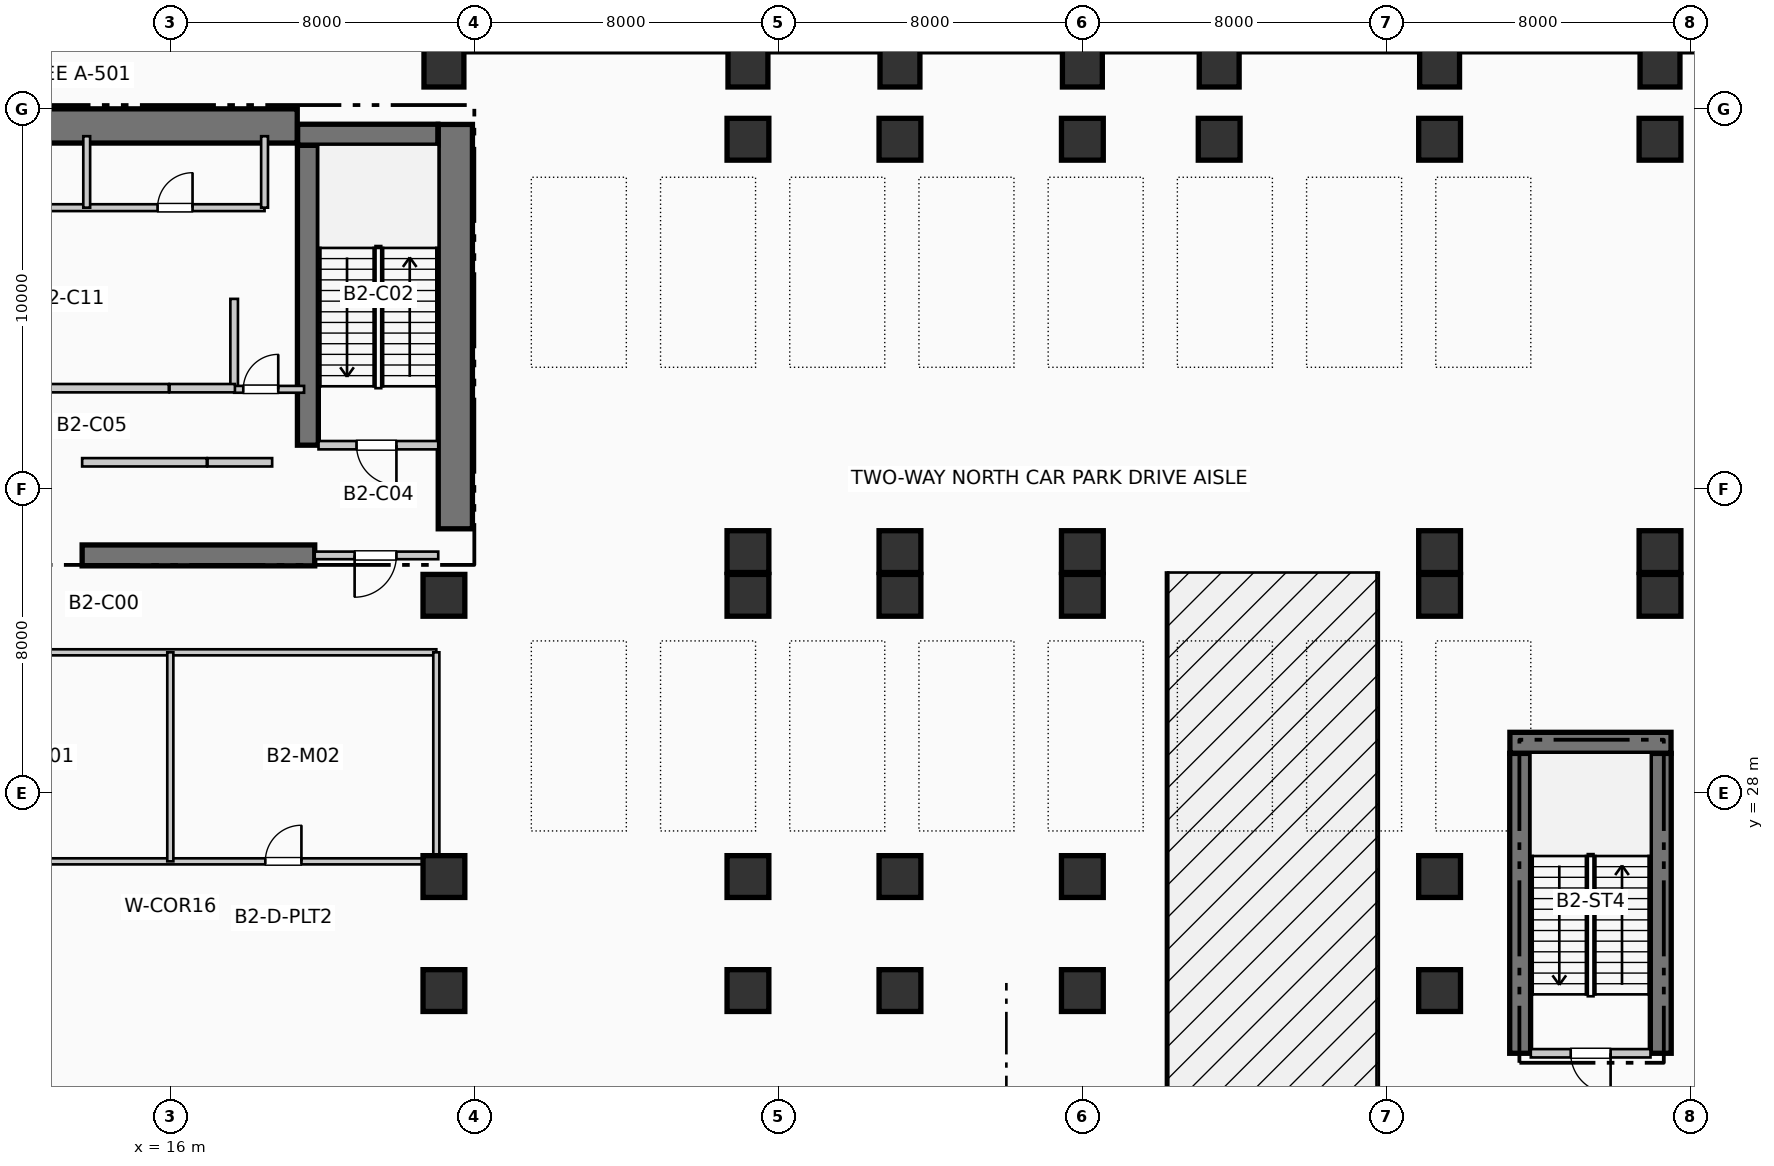
"""IFC4 building model, lengths in metres.
Left out: names, types, materials, properties, quantities, classifications, styles, units other than length and angle.
Written with IfcOpenShell. Run it as: python <this file> out.ifc"""

import sys

from ifc_helpers import new_model, si_unit, direction, frame, frame_2d, origin, origin_2d, place, context, subcontext, project, spatial, rectangle, extrude, element, fill, save


model = new_model("IFC4")
c1 = context("Model", 3, precision=1e-05, world=origin(), true_north=direction((0.0, 1.0)))
c2 = subcontext(c1, "Body", "Model", "MODEL_VIEW")
j1 = project(units=[si_unit("LENGTHUNIT", "METRE"), si_unit("PLANEANGLEUNIT", "RADIAN")], contexts=[c1])
p1 = place(None, origin())
s1 = spatial("IfcSite", under=j1, at=p1, CompositionType="ELEMENT")
p2 = place(p1, origin())
s2 = spatial("IfcBuilding", under=s1, at=p2, CompositionType="ELEMENT")
p3 = place(p2, frame((0.0, 0.0, -9.24)))
s3 = spatial("IfcBuildingStorey", under=s2, at=p3, CompositionType="ELEMENT", Elevation=-9.24)
p4 = place(p3, frame((5.36, 45.55, 0.0), z_axis=(0.0, 0.0, 1.0), x_axis=(1.0, 0.0, 0.0)))
e1 = element("IfcWall", 1, at=p4, inside=s3, PredefinedType="SHEAR", context=c2, shape_type="SweptSolid", body=[
    extrude(rectangle(XDim=13.98, YDim=0.9, at=frame_2d((6.99, 0.0))), origin(), (0.0, 0.0, 1.0), 4.62),
])
p5 = place(p3, frame((23.5, 34.95, 0.0), z_axis=(0.0, 0.0, 1.0), x_axis=(0.0, 1.0, 0.0)))
e2 = element("IfcWall", 2, at=p5, inside=s3, PredefinedType="SHEAR", context=c2, shape_type="SweptSolid", body=[
    extrude(rectangle(XDim=10.64, YDim=0.9, at=frame_2d((5.32, 0.0))), origin(), (0.0, 0.0, 1.0), 4.62),
])
p6 = place(p3, frame((13.68, 34.25, 0.0), z_axis=(0.0, 0.0, 1.0), x_axis=(1.0, 0.0, 0.0)))
e3 = element("IfcWall", 3, at=p6, inside=s3, PredefinedType="SHEAR", context=c2, shape_type="SweptSolid", body=[
    extrude(rectangle(XDim=6.12, YDim=0.55, at=frame_2d((3.06, 0.0))), origin(), (0.0, 0.0, 1.0), 4.62),
])
p7 = place(p3, frame((19.62, 37.15, 0.0), z_axis=(0.0, 0.0, 1.0), x_axis=(0.0, 1.0, 0.0)))
e4 = element("IfcWall", 4, at=p7, inside=s3, PredefinedType="SHEAR", context=c2, shape_type="SweptSolid", body=[
    extrude(rectangle(XDim=7.89, YDim=0.55, at=frame_2d((3.945, 0.0))), origin(), (0.0, 0.0, 1.0), 4.62),
])
p8 = place(p3, frame((19.35, 45.32, 0.0), z_axis=(0.0, 0.0, 1.0), x_axis=(1.0, 0.0, 0.0)))
e5 = element("IfcWall", 5, at=p8, inside=s3, PredefinedType="SHEAR", context=c2, shape_type="SweptSolid", body=[
    extrude(rectangle(XDim=3.69, YDim=0.55, at=frame_2d((1.845, 0.0))), origin(), (0.0, 0.0, 1.0), 4.62),
])
for number, where, z_axis, x_axis in (
    (6, (51.52, 21.15, 0.0), (0.0, 0.0, 1.0), (0.0, 1.0, 0.0)),
    (7, (55.22, 21.15, 0.0), (0.0, 0.0, 1.0), (0.0, 1.0, 0.0)),
):
    element("IfcWall", number, at=place(p3, frame(where, z_axis=z_axis, x_axis=x_axis)), inside=s3, PredefinedType="SHEAR", context=c2, shape_type="SweptSolid", body=[
        extrude(rectangle(XDim=7.89, YDim=0.55, at=frame_2d((3.945, 0.0))), origin(), (0.0, 0.0, 1.0), 4.62),
    ])
p9 = place(p3, frame((51.25, 29.32, 0.0), z_axis=(0.0, 0.0, 1.0), x_axis=(1.0, 0.0, 0.0)))
e8 = element("IfcWall", 8, at=p9, inside=s3, PredefinedType="SHEAR", context=c2, shape_type="SweptSolid", body=[
    extrude(rectangle(XDim=4.24, YDim=0.55, at=frame_2d((2.12, 0.0))), origin(), (0.0, 0.0, 1.0), 4.62),
])
for number, where, z_axis, x_axis in (
    (9, (23.2, 22.8, 0.0), (0.0, 0.0, 1.0), (1.0, 0.0, 0.0)),
    (10, (23.2, 25.8, 0.0), (0.0, 0.0, 1.0), (1.0, 0.0, 0.0)),
    (11, (23.2, 33.2, 0.0), (0.0, 0.0, 1.0), (1.0, 0.0, 0.0)),
):
    element("IfcColumn", number, at=place(p3, frame(where, z_axis=z_axis, x_axis=x_axis)), inside=s3, PredefinedType="COLUMN", context=c2, shape_type="SweptSolid", body=[
        extrude(rectangle(XDim=1.1, YDim=1.1, at=origin_2d()), origin(), (0.0, 0.0, 1.0), 4.62),
    ])
p10 = place(p3, frame((23.2, 47.1, 0.0), z_axis=(0.0, 0.0, 1.0), x_axis=(1.0, 0.0, 0.0)))
e12 = element("IfcColumn", 12, at=p10, inside=s3, PredefinedType="COLUMN", context=c2, shape_type="SweptSolid", body=[
    extrude(rectangle(XDim=1.05, YDim=1.05, at=origin_2d()), origin(), (0.0, 0.0, 1.0), 4.62),
])
for number, where, z_axis, x_axis in (
    (13, (31.2, 22.8, 0.0), (0.0, 0.0, 1.0), (1.0, 0.0, 0.0)),
    (14, (31.2, 25.8, 0.0), (0.0, 0.0, 1.0), (1.0, 0.0, 0.0)),
    (15, (31.2, 33.2, 0.0), (0.0, 0.0, 1.0), (1.0, 0.0, 0.0)),
    (16, (31.2, 34.35, 0.0), (0.0, 0.0, 1.0), (1.0, 0.0, 0.0)),
    (17, (31.2, 45.2, 0.0), (0.0, 0.0, 1.0), (1.0, 0.0, 0.0)),
):
    element("IfcColumn", number, at=place(p3, frame(where, z_axis=z_axis, x_axis=x_axis)), inside=s3, PredefinedType="COLUMN", context=c2, shape_type="SweptSolid", body=[
        extrude(rectangle(XDim=1.1, YDim=1.1, at=origin_2d()), origin(), (0.0, 0.0, 1.0), 4.62),
    ])
p11 = place(p3, frame((31.2, 47.1, 0.0), z_axis=(0.0, 0.0, 1.0), x_axis=(1.0, 0.0, 0.0)))
e18 = element("IfcColumn", 18, at=p11, inside=s3, PredefinedType="COLUMN", context=c2, shape_type="SweptSolid", body=[
    extrude(rectangle(XDim=1.05, YDim=1.05, at=origin_2d()), origin(), (0.0, 0.0, 1.0), 4.62),
])
for number, where, z_axis, x_axis in (
    (19, (35.2, 22.8, 0.0), (0.0, 0.0, 1.0), (1.0, 0.0, 0.0)),
    (20, (35.2, 25.8, 0.0), (0.0, 0.0, 1.0), (1.0, 0.0, 0.0)),
    (21, (35.2, 33.2, 0.0), (0.0, 0.0, 1.0), (1.0, 0.0, 0.0)),
    (22, (35.2, 34.35, 0.0), (0.0, 0.0, 1.0), (1.0, 0.0, 0.0)),
    (23, (35.2, 45.2, 0.0), (0.0, 0.0, 1.0), (1.0, 0.0, 0.0)),
):
    element("IfcColumn", number, at=place(p3, frame(where, z_axis=z_axis, x_axis=x_axis)), inside=s3, PredefinedType="COLUMN", context=c2, shape_type="SweptSolid", body=[
        extrude(rectangle(XDim=1.1, YDim=1.1, at=origin_2d()), origin(), (0.0, 0.0, 1.0), 4.62),
    ])
p12 = place(p3, frame((35.2, 47.1, 0.0), z_axis=(0.0, 0.0, 1.0), x_axis=(1.0, 0.0, 0.0)))
e24 = element("IfcColumn", 24, at=p12, inside=s3, PredefinedType="COLUMN", context=c2, shape_type="SweptSolid", body=[
    extrude(rectangle(XDim=1.05, YDim=1.05, at=origin_2d()), origin(), (0.0, 0.0, 1.0), 4.62),
])
for number, where, z_axis, x_axis in (
    (25, (40.0, 22.8, 0.0), (0.0, 0.0, 1.0), (1.0, 0.0, 0.0)),
    (26, (40.0, 25.8, 0.0), (0.0, 0.0, 1.0), (1.0, 0.0, 0.0)),
    (27, (40.0, 33.2, 0.0), (0.0, 0.0, 1.0), (1.0, 0.0, 0.0)),
    (28, (40.0, 34.35, 0.0), (0.0, 0.0, 1.0), (1.0, 0.0, 0.0)),
    (29, (40.0, 45.2, 0.0), (0.0, 0.0, 1.0), (1.0, 0.0, 0.0)),
):
    element("IfcColumn", number, at=place(p3, frame(where, z_axis=z_axis, x_axis=x_axis)), inside=s3, PredefinedType="COLUMN", context=c2, shape_type="SweptSolid", body=[
        extrude(rectangle(XDim=1.1, YDim=1.1, at=origin_2d()), origin(), (0.0, 0.0, 1.0), 4.62),
    ])
p13 = place(p3, frame((40.0, 47.1, 0.0), z_axis=(0.0, 0.0, 1.0), x_axis=(1.0, 0.0, 0.0)))
e30 = element("IfcColumn", 30, at=p13, inside=s3, PredefinedType="COLUMN", context=c2, shape_type="SweptSolid", body=[
    extrude(rectangle(XDim=1.05, YDim=1.05, at=origin_2d()), origin(), (0.0, 0.0, 1.0), 4.62),
])
p14 = place(p3, frame((43.6, 45.2, 0.0), z_axis=(0.0, 0.0, 1.0), x_axis=(1.0, 0.0, 0.0)))
e31 = element("IfcColumn", 31, at=p14, inside=s3, PredefinedType="COLUMN", context=c2, shape_type="SweptSolid", body=[
    extrude(rectangle(XDim=1.1, YDim=1.1, at=origin_2d()), origin(), (0.0, 0.0, 1.0), 4.62),
])
p15 = place(p3, frame((43.6, 47.1, 0.0), z_axis=(0.0, 0.0, 1.0), x_axis=(1.0, 0.0, 0.0)))
e32 = element("IfcColumn", 32, at=p15, inside=s3, PredefinedType="COLUMN", context=c2, shape_type="SweptSolid", body=[
    extrude(rectangle(XDim=1.05, YDim=1.05, at=origin_2d()), origin(), (0.0, 0.0, 1.0), 4.62),
])
for number, where, z_axis, x_axis in (
    (33, (49.4, 22.8, 0.0), (0.0, 0.0, 1.0), (1.0, 0.0, 0.0)),
    (34, (49.4, 25.8, 0.0), (0.0, 0.0, 1.0), (1.0, 0.0, 0.0)),
    (35, (49.4, 33.2, 0.0), (0.0, 0.0, 1.0), (1.0, 0.0, 0.0)),
    (36, (49.4, 34.35, 0.0), (0.0, 0.0, 1.0), (1.0, 0.0, 0.0)),
    (37, (49.4, 45.2, 0.0), (0.0, 0.0, 1.0), (1.0, 0.0, 0.0)),
):
    element("IfcColumn", number, at=place(p3, frame(where, z_axis=z_axis, x_axis=x_axis)), inside=s3, PredefinedType="COLUMN", context=c2, shape_type="SweptSolid", body=[
        extrude(rectangle(XDim=1.1, YDim=1.1, at=origin_2d()), origin(), (0.0, 0.0, 1.0), 4.62),
    ])
p16 = place(p3, frame((49.4, 47.1, 0.0), z_axis=(0.0, 0.0, 1.0), x_axis=(1.0, 0.0, 0.0)))
e38 = element("IfcColumn", 38, at=p16, inside=s3, PredefinedType="COLUMN", context=c2, shape_type="SweptSolid", body=[
    extrude(rectangle(XDim=1.05, YDim=1.05, at=origin_2d()), origin(), (0.0, 0.0, 1.0), 4.62),
])
for number, where, z_axis, x_axis in (
    (39, (55.2, 33.2, 0.0), (0.0, 0.0, 1.0), (1.0, 0.0, 0.0)),
    (40, (55.2, 34.35, 0.0), (0.0, 0.0, 1.0), (1.0, 0.0, 0.0)),
    (41, (55.2, 45.2, 0.0), (0.0, 0.0, 1.0), (1.0, 0.0, 0.0)),
):
    element("IfcColumn", number, at=place(p3, frame(where, z_axis=z_axis, x_axis=x_axis)), inside=s3, PredefinedType="COLUMN", context=c2, shape_type="SweptSolid", body=[
        extrude(rectangle(XDim=1.1, YDim=1.1, at=origin_2d()), origin(), (0.0, 0.0, 1.0), 4.62),
    ])
p17 = place(p3, frame((55.2, 47.1, 0.0), z_axis=(0.0, 0.0, 1.0), x_axis=(1.0, 0.0, 0.0)))
e42 = element("IfcColumn", 42, at=p17, inside=s3, PredefinedType="COLUMN", context=c2, shape_type="SweptSolid", body=[
    extrude(rectangle(XDim=1.05, YDim=1.05, at=origin_2d()), origin(), (0.0, 0.0, 1.0), 4.62),
])
p18 = place(p3, frame((19.9, 37.15, 0.0), z_axis=(0.0, 0.0, 1.0), x_axis=(1.0, 0.0, 0.0)))
e43 = element("IfcWall", 43, at=p18, inside=s3, PredefinedType="PARTITIONING", context=c2, shape_type="SweptSolid", body=[
    extrude(rectangle(XDim=3.15, YDim=0.22, at=frame_2d((1.575, 0.0))), origin(), (0.0, 0.0, 1.0), 4.27),
])
p19 = place(p18, frame((2.05, 0.0, 0.0), z_axis=(0.0, 0.0, 1.0), x_axis=(-1.0, 0.0, 0.0)))
e44 = element("IfcOpeningElement", 44, at=p19, cuts=e43, PredefinedType="OPENING", context=c2, shape_type="SweptSolid", body=[
    extrude(rectangle(XDim=1.05, YDim=2.15, at=frame_2d((0.525, 1.075))), frame((0.0, 0.12, 0.0), z_axis=(0.0, -1.0, 0.0), x_axis=(1.0, 0.0, 0.0)), (0.0, 0.0, 1.0), 0.24),
])
p20 = place(p3, frame((19.8, 34.25, 0.0), z_axis=(0.0, 0.0, 1.0), x_axis=(1.0, 0.0, 0.0)))
e45 = element("IfcWall", 45, at=p20, inside=s3, PredefinedType="PARTITIONING", context=c2, shape_type="SweptSolid", body=[
    extrude(rectangle(XDim=3.25, YDim=0.2, at=frame_2d((1.625, 0.0))), origin(), (0.0, 0.0, 1.0), 4.27),
])
p21 = place(p20, frame((2.15, 0.0, 0.0), z_axis=(0.0, 0.0, 1.0), x_axis=(-1.0, 0.0, 0.0)))
e46 = element("IfcOpeningElement", 46, at=p21, cuts=e45, PredefinedType="OPENING", context=c2, shape_type="SweptSolid", body=[
    extrude(rectangle(XDim=1.1, YDim=2.15, at=frame_2d((0.55, 1.075))), frame((0.0, 0.11, 0.0), z_axis=(0.0, -1.0, 0.0), x_axis=(1.0, 0.0, 0.0)), (0.0, 0.0, 1.0), 0.22),
])
p22 = place(p3, frame((17.68, 38.65, 0.0), z_axis=(0.0, 0.0, 1.0), x_axis=(0.0, 1.0, 0.0)))
e47 = element("IfcWall", 47, at=p22, inside=s3, PredefinedType="PARTITIONING", context=c2, shape_type="SweptSolid", body=[
    extrude(rectangle(XDim=2.35, YDim=0.2, at=frame_2d((1.175, 0.0))), origin(), (0.0, 0.0, 1.0), 4.27),
])
p23 = place(p3, frame((17.68, 38.62, 0.0), z_axis=(0.0, 0.0, 1.0), x_axis=(1.0, 0.0, 0.0)))
e48 = element("IfcWall", 48, at=p23, inside=s3, PredefinedType="PARTITIONING", context=c2, shape_type="SweptSolid", body=[
    extrude(rectangle(XDim=1.84, YDim=0.18, at=frame_2d((0.92, 0.0))), origin(), (0.0, 0.0, 1.0), 4.27),
])
p24 = place(p23, frame((0.24, 0.0, 0.0)))
e49 = element("IfcOpeningElement", 49, at=p24, cuts=e48, PredefinedType="OPENING", context=c2, shape_type="SweptSolid", body=[
    extrude(rectangle(XDim=0.92, YDim=2.1, at=frame_2d((0.46, 1.05))), frame((0.0, 0.1, 0.0), z_axis=(0.0, -1.0, 0.0), x_axis=(1.0, 0.0, 0.0)), (0.0, 0.0, 1.0), 0.2),
])
p25 = place(p3, frame((13.68, 36.7, 0.0), z_axis=(0.0, 0.0, 1.0), x_axis=(1.0, 0.0, 0.0)))
e50 = element("IfcWall", 50, at=p25, inside=s3, PredefinedType="PARTITIONING", context=c2, shape_type="SweptSolid", body=[
    extrude(rectangle(XDim=3.28, YDim=0.22, at=frame_2d((1.64, 0.0))), origin(), (0.0, 0.0, 1.0), 4.27),
])
p26 = place(p3, frame((12.58, 38.65, 0.0), z_axis=(0.0, 0.0, 1.0), x_axis=(1.0, 0.0, 0.0)))
e51 = element("IfcWall", 51, at=p26, inside=s3, PredefinedType="PARTITIONING", context=c2, shape_type="SweptSolid", body=[
    extrude(rectangle(XDim=3.38, YDim=0.22, at=frame_2d((1.69, 0.0))), origin(), (0.0, 0.0, 1.0), 4.27),
])
p27 = place(p3, frame((16.98, 36.7, 0.0), z_axis=(0.0, 0.0, 1.0), x_axis=(1.0, 0.0, 0.0)))
e52 = element("IfcWall", 52, at=p27, inside=s3, PredefinedType="PARTITIONING", context=c2, shape_type="SweptSolid", body=[
    extrude(rectangle(XDim=1.7, YDim=0.22, at=frame_2d((0.85, 0.0))), origin(), (0.0, 0.0, 1.0), 4.27),
])
p28 = place(p3, frame((15.98, 38.65, 0.0), z_axis=(0.0, 0.0, 1.0), x_axis=(1.0, 0.0, 0.0)))
e53 = element("IfcWall", 53, at=p28, inside=s3, PredefinedType="PARTITIONING", context=c2, shape_type="SweptSolid", body=[
    extrude(rectangle(XDim=1.72, YDim=0.22, at=frame_2d((0.86, 0.0))), origin(), (0.0, 0.0, 1.0), 4.27),
])
p29 = place(p3, frame((9.15, 43.4, 0.0), z_axis=(0.0, 0.0, 1.0), x_axis=(1.0, 0.0, 0.0)))
e54 = element("IfcWall", 54, at=p29, inside=s3, PredefinedType="PLUMBINGWALL", context=c2, shape_type="SweptSolid", body=[
    extrude(rectangle(XDim=9.33, YDim=0.18, at=frame_2d((4.665, 0.0))), origin(), (0.0, 0.0, 1.0), 4.27),
])
p30 = place(p29, frame((1.88, 0.0, 0.0)))
e55 = element("IfcOpeningElement", 55, at=p30, cuts=e54, PredefinedType="OPENING", context=c2, shape_type="SweptSolid", body=[
    extrude(rectangle(XDim=0.92, YDim=2.1, at=frame_2d((0.46, 1.05))), frame((0.0, 0.1, 0.0), z_axis=(0.0, -1.0, 0.0), x_axis=(1.0, 0.0, 0.0)), (0.0, 0.0, 1.0), 0.2),
])
p31 = place(p29, frame((6.515, 0.0, 0.0)))
e56 = element("IfcOpeningElement", 56, at=p31, cuts=e54, PredefinedType="OPENING", context=c2, shape_type="SweptSolid", body=[
    extrude(rectangle(XDim=0.92, YDim=2.1, at=frame_2d((0.46, 1.05))), frame((0.0, 0.1, 0.0), z_axis=(0.0, -1.0, 0.0), x_axis=(1.0, 0.0, 0.0)), (0.0, 0.0, 1.0), 0.2),
])
for number, where, z_axis, x_axis in (
    (57, (18.48, 43.4, 0.0), (0.0, 0.0, 1.0), (0.0, 1.0, 0.0)),
    (58, (13.8, 43.4, 0.0), (0.0, 0.0, 1.0), (0.0, 1.0, 0.0)),
):
    element("IfcWall", number, at=place(p3, frame(where, z_axis=z_axis, x_axis=x_axis)), inside=s3, PredefinedType="PLUMBINGWALL", context=c2, shape_type="SweptSolid", body=[
        extrude(rectangle(XDim=1.88, YDim=0.18, at=frame_2d((0.94, 0.0))), origin(), (0.0, 0.0, 1.0), 4.27),
    ])
p32 = place(p3, frame((51.8, 21.15, 0.0), z_axis=(0.0, 0.0, 1.0), x_axis=(1.0, 0.0, 0.0)))
e59 = element("IfcWall", 59, at=p32, inside=s3, PredefinedType="PARTITIONING", context=c2, shape_type="SweptSolid", body=[
    extrude(rectangle(XDim=3.15, YDim=0.22, at=frame_2d((1.575, 0.0))), origin(), (0.0, 0.0, 1.0), 4.27),
])
p33 = place(p32, frame((2.1, 0.0, 0.0), z_axis=(0.0, 0.0, 1.0), x_axis=(-1.0, 0.0, 0.0)))
e60 = element("IfcOpeningElement", 60, at=p33, cuts=e59, PredefinedType="OPENING", context=c2, shape_type="SweptSolid", body=[
    extrude(rectangle(XDim=1.05, YDim=2.15, at=frame_2d((0.525, 1.075))), frame((0.0, 0.12, 0.0), z_axis=(0.0, -1.0, 0.0), x_axis=(1.0, 0.0, 0.0)), (0.0, 0.0, 1.0), 0.24),
])
p34 = place(p3, frame((9.0, 26.2, 0.0), z_axis=(0.0, 0.0, 1.0), x_axis=(1.0, 0.0, 0.0)))
e61 = element("IfcWall", 61, at=p34, inside=s3, PredefinedType="PARTITIONING", context=c2, shape_type="SweptSolid", body=[
    extrude(rectangle(XDim=14.0, YDim=0.16, at=frame_2d((7.0, 0.0))), origin(), (0.0, 0.0, 1.0), 3.455),
])
p35 = place(p34, frame((1.0, 0.0, 0.0)))
e62 = element("IfcOpeningElement", 62, at=p35, cuts=e61, PredefinedType="OPENING", context=c2, shape_type="SweptSolid", body=[
    extrude(rectangle(XDim=0.95, YDim=2.1, at=frame_2d((0.475, 1.05))), frame((0.0, 0.09, 0.0), z_axis=(0.0, -1.0, 0.0), x_axis=(1.0, 0.0, 0.0)), (0.0, 0.0, 1.0), 0.18),
])
p36 = place(p34, frame((9.5, 0.0, 0.0)))
e63 = element("IfcOpeningElement", 63, at=p36, cuts=e61, PredefinedType="OPENING", context=c2, shape_type="SweptSolid", body=[
    extrude(rectangle(XDim=0.95, YDim=2.1, at=frame_2d((0.475, 1.05))), frame((0.0, 0.09, 0.0), z_axis=(0.0, -1.0, 0.0), x_axis=(1.0, 0.0, 0.0)), (0.0, 0.0, 1.0), 0.18),
])
p37 = place(p3, frame((9.0, 31.7, 0.0), z_axis=(0.0, 0.0, 1.0), x_axis=(1.0, 0.0, 0.0)))
e64 = element("IfcWall", 64, at=p37, inside=s3, PredefinedType="PARTITIONING", context=c2, shape_type="SweptSolid", body=[
    extrude(rectangle(XDim=14.0, YDim=0.16, at=frame_2d((7.0, 0.0))), origin(), (0.0, 0.0, 1.0), 4.27),
])
p38 = place(p3, frame((23.0, 26.2, 0.0), z_axis=(0.0, 0.0, 1.0), x_axis=(0.0, 1.0, 0.0)))
e65 = element("IfcWall", 65, at=p38, inside=s3, PredefinedType="PARTITIONING", context=c2, shape_type="SweptSolid", body=[
    extrude(rectangle(XDim=5.5, YDim=0.16, at=frame_2d((2.75, 0.0))), origin(), (0.0, 0.0, 1.0), 3.455),
])
p39 = place(p3, frame((16.0, 26.2, 0.0), z_axis=(0.0, 0.0, 1.0), x_axis=(0.0, 1.0, 0.0)))
e66 = element("IfcWall", 66, at=p39, inside=s3, PredefinedType="PARTITIONING", context=c2, shape_type="SweptSolid", body=[
    extrude(rectangle(XDim=5.5, YDim=0.16, at=frame_2d((2.75, 0.0))), origin(), (0.0, 0.0, 1.0), 4.27),
])
p40 = place(p19, origin())
e67 = element("IfcDoor", 67, at=p40, inside=s3, OperationType="SINGLE_SWING_RIGHT", PredefinedType="DOOR", context=c2, shape_type="SweptSolid", body=[
    extrude(rectangle(XDim=1.05, YDim=2.15, at=frame_2d((0.525, 1.075))), frame((0.0, 0.025, 0.0), z_axis=(0.0, -1.0, 0.0), x_axis=(1.0, 0.0, 0.0)), (0.0, 0.0, 1.0), 0.05),
])
fill(e44, e67)
p41 = place(p21, origin())
e68 = element("IfcDoor", 68, at=p41, inside=s3, OperationType="SINGLE_SWING_LEFT", PredefinedType="DOOR", context=c2, shape_type="SweptSolid", body=[
    extrude(rectangle(XDim=1.1, YDim=2.15, at=frame_2d((0.55, 1.075))), frame((0.0, 0.025, 0.0), z_axis=(0.0, -1.0, 0.0), x_axis=(1.0, 0.0, 0.0)), (0.0, 0.0, 1.0), 0.05),
])
fill(e46, e68)
p42 = place(p24, origin())
e69 = element("IfcDoor", 69, at=p42, inside=s3, OperationType="SINGLE_SWING_RIGHT", PredefinedType="DOOR", context=c2, shape_type="SweptSolid", body=[
    extrude(rectangle(XDim=0.92, YDim=2.1, at=frame_2d((0.46, 1.05))), frame((0.0, 0.025, 0.0), z_axis=(0.0, -1.0, 0.0), x_axis=(1.0, 0.0, 0.0)), (0.0, 0.0, 1.0), 0.05),
])
fill(e49, e69)
p43 = place(p31, origin())
e70 = element("IfcDoor", 70, at=p43, inside=s3, OperationType="SINGLE_SWING_RIGHT", PredefinedType="DOOR", context=c2, shape_type="SweptSolid", body=[
    extrude(rectangle(XDim=0.92, YDim=2.1, at=frame_2d((0.46, 1.05))), frame((0.0, 0.025, 0.0), z_axis=(0.0, -1.0, 0.0), x_axis=(1.0, 0.0, 0.0)), (0.0, 0.0, 1.0), 0.05),
])
fill(e56, e70)
p44 = place(p33, origin())
e71 = element("IfcDoor", 71, at=p44, inside=s3, OperationType="SINGLE_SWING_RIGHT", PredefinedType="DOOR", context=c2, shape_type="SweptSolid", body=[
    extrude(rectangle(XDim=1.05, YDim=2.15, at=frame_2d((0.525, 1.075))), frame((0.0, 0.025, 0.0), z_axis=(0.0, -1.0, 0.0), x_axis=(1.0, 0.0, 0.0)), (0.0, 0.0, 1.0), 0.05),
])
fill(e60, e71)
p45 = place(p36, origin())
e72 = element("IfcDoor", 72, at=p45, inside=s3, OperationType="SINGLE_SWING_RIGHT", PredefinedType="DOOR", context=c2, shape_type="SweptSolid", body=[
    extrude(rectangle(XDim=0.95, YDim=2.1, at=frame_2d((0.475, 1.05))), frame((0.0, 0.025, 0.0), z_axis=(0.0, -1.0, 0.0), x_axis=(1.0, 0.0, 0.0)), (0.0, 0.0, 1.0), 0.05),
])
fill(e63, e72)
save(model, sys.argv[1])
